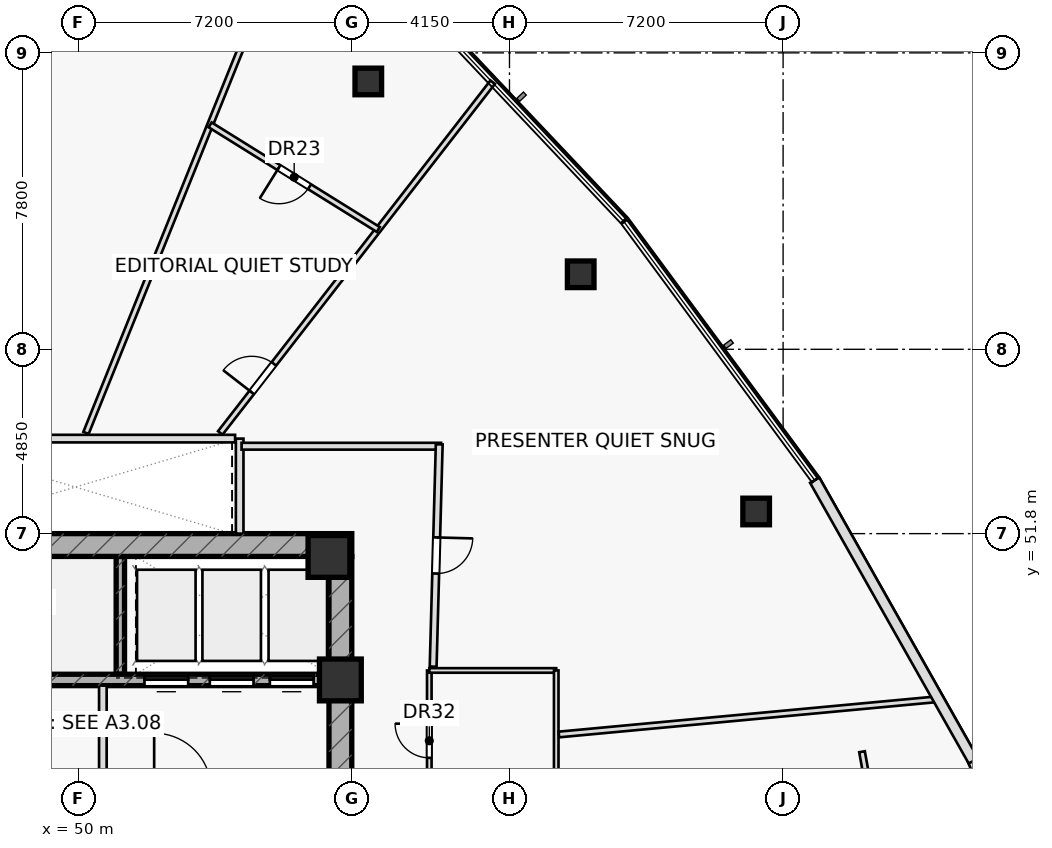
"""IFC4 building model, lengths in metres.
Left out: names, types, materials, properties, quantities, classifications, styles, units other than length and angle.
Written with IfcOpenShell. Run it as: python <this file> out.ifc"""

import sys

from ifc_helpers import new_model, si_unit, direction, frame, frame_2d, origin, origin_2d, place, context, subcontext, project, spatial, rectangle, hollow_rectangle, extrude, element, fill, save


model = new_model("IFC4")
c1 = context("Model", 3, precision=1e-05, world=origin(), true_north=direction((0.0, 1.0)))
c2 = subcontext(c1, "Body", "Model", "MODEL_VIEW")
j1 = project(units=[si_unit("LENGTHUNIT", "METRE"), si_unit("PLANEANGLEUNIT", "RADIAN")], contexts=[c1])
p1 = place(None, origin())
s1 = spatial("IfcSite", under=j1, at=p1, CompositionType="ELEMENT")
p2 = place(p1, origin())
s2 = spatial("IfcBuilding", under=s1, at=p2, CompositionType="ELEMENT")
p3 = place(p2, frame((0.0, 0.0, 66.6)))
s3 = spatial("IfcBuildingStorey", under=s2, at=p3, CompositionType="ELEMENT", Elevation=66.6)
p4 = place(p3, frame((51.11, 48.1, 0.0), z_axis=(0.0, 0.0, 1.0), x_axis=(0.0, 1.0, 0.0)))
e1 = element("IfcWall", 1, at=p4, inside=s3, PredefinedType="SHEAR", context=c2, shape_type="SweptSolid", body=[
    extrude(rectangle(XDim=3.1, YDim=0.22, at=frame_2d((1.55, 0.0))), origin(), (0.0, 0.0, 1.0), 3.6),
])
p5 = place(p3, frame((42.8, 51.5, 0.0), z_axis=(0.0, 0.0, 1.0), x_axis=(1.0, 0.0, 0.0)))
e2 = element("IfcWall", 2, at=p5, inside=s3, PredefinedType="SHEAR", context=c2, shape_type="SweptSolid", body=[
    extrude(rectangle(XDim=14.4, YDim=0.6, at=frame_2d((7.2, 0.0))), origin(), (0.0, 0.0, 1.0), 3.6),
])
p6 = place(p5, frame((0.88, 0.0, 0.0)))
e3 = element("IfcOpeningElement", 3, at=p6, cuts=e2, PredefinedType="OPENING", context=c2, shape_type="SweptSolid", body=[
    extrude(rectangle(XDim=1.05, YDim=2.2, at=frame_2d((0.525, 1.1))), frame((0.0, 0.31, 0.0), z_axis=(0.0, -1.0, 0.0), x_axis=(1.0, 0.0, 0.0)), (0.0, 0.0, 1.0), 0.62),
])
p7 = place(p3, frame((56.9, 38.8, 0.0), z_axis=(0.0, 0.0, 1.0), x_axis=(0.0, 1.0, 0.0)))
e4 = element("IfcWall", 4, at=p7, inside=s3, PredefinedType="SHEAR", context=c2, shape_type="SweptSolid", body=[
    extrude(rectangle(XDim=12.4, YDim=0.6, at=frame_2d((6.2, 0.0))), origin(), (0.0, 0.0, 1.0), 3.6),
])
p8 = place(p7, frame((3.85, 0.0, 0.0)))
e5 = element("IfcOpeningElement", 5, at=p8, cuts=e4, PredefinedType="OPENING", context=c2, shape_type="SweptSolid", body=[
    extrude(rectangle(XDim=1.5, YDim=2.2, at=frame_2d((0.75, 1.1))), frame((0.0, 0.31, 0.0), z_axis=(0.0, -1.0, 0.0), x_axis=(1.0, 0.0, 0.0)), (0.0, 0.0, 1.0), 0.62),
])
p9 = place(p3, frame((43.4, 47.95, 0.0), z_axis=(0.0, 0.0, 1.0), x_axis=(1.0, 0.0, 0.0)))
e6 = element("IfcWall", 6, at=p9, inside=s3, PredefinedType="SHEAR", context=c2, shape_type="SweptSolid", body=[
    extrude(rectangle(XDim=13.2, YDim=0.3, at=frame_2d((6.6, 0.0))), origin(), (0.0, 0.0, 1.0), 3.6),
])
p10 = place(p9, frame((8.345, 0.0, 0.0)))
e7 = element("IfcOpeningElement", 7, at=p10, cuts=e6, PredefinedType="OPENING", context=c2, shape_type="SweptSolid", body=[
    extrude(rectangle(XDim=1.15, YDim=2.2, at=frame_2d((0.575, 1.1))), frame((0.0, 0.16, 0.0), z_axis=(0.0, -1.0, 0.0), x_axis=(1.0, 0.0, 0.0)), (0.0, 0.0, 1.0), 0.32),
])
p11 = place(p9, frame((10.065, 0.0, 0.0)))
e8 = element("IfcOpeningElement", 8, at=p11, cuts=e6, PredefinedType="OPENING", context=c2, shape_type="SweptSolid", body=[
    extrude(rectangle(XDim=1.15, YDim=2.2, at=frame_2d((0.575, 1.1))), frame((0.0, 0.16, 0.0), z_axis=(0.0, -1.0, 0.0), x_axis=(1.0, 0.0, 0.0)), (0.0, 0.0, 1.0), 0.32),
])
p12 = place(p9, frame((11.645, 0.0, 0.0)))
e9 = element("IfcOpeningElement", 9, at=p12, cuts=e6, PredefinedType="OPENING", context=c2, shape_type="SweptSolid", body=[
    extrude(rectangle(XDim=1.15, YDim=2.2, at=frame_2d((0.575, 1.1))), frame((0.0, 0.16, 0.0), z_axis=(0.0, -1.0, 0.0), x_axis=(1.0, 0.0, 0.0)), (0.0, 0.0, 1.0), 0.32),
])
for number, where, z_axis, x_axis in (
    (10, (56.9, 47.95, 0.0), (0.0, 0.0, 1.0), (1.0, 0.0, 0.0)),
    (11, (56.6, 51.2, 0.0), (0.0, 0.0, 1.0), (1.0, 0.0, 0.0)),
):
    element("IfcColumn", number, at=place(p3, frame(where, z_axis=z_axis, x_axis=x_axis)), inside=s3, PredefinedType="COLUMN", context=c2, shape_type="SweptSolid", body=[
        extrude(rectangle(XDim=1.1, YDim=1.1, at=origin_2d()), origin(), (0.0, 0.0, 1.0), 3.6),
    ])
for number, where, z_axis, x_axis in (
    (12, (67.841, 52.383, 0.0), (0.0, 0.0, 1.0), (1.0, 0.0, 0.0)),
    (13, (63.224, 58.624, 0.0), (0.0, 0.0, 1.0), (1.0, 0.0, 0.0)),
    (14, (57.635, 63.698, 0.0), (0.0, 0.0, 1.0), (1.0, 0.0, 0.0)),
):
    element("IfcColumn", number, at=place(p3, frame(where, z_axis=z_axis, x_axis=x_axis)), inside=s3, PredefinedType="COLUMN", context=c2, shape_type="SweptSolid", body=[
        extrude(hollow_rectangle(XDim=0.7, YDim=0.7, WallThickness=0.04, at=origin_2d()), origin(), (0.0, 0.0, 1.0), 3.6),
    ])
p13 = place(p3, frame((54.25, 51.8, 0.0), z_axis=(0.0, 0.0, 1.0), x_axis=(0.0, 1.0, 0.0)))
e15 = element("IfcWall", 15, at=p13, inside=s3, PredefinedType="PARTITIONING", context=c2, shape_type="SweptSolid", body=[
    extrude(rectangle(XDim=2.5, YDim=0.2, at=frame_2d((1.25, 0.0))), origin(), (0.0, 0.0, 1.0), 3.6),
])
p14 = place(p3, frame((50.65, 45.05, 0.0), z_axis=(0.0, 0.0, 1.0), x_axis=(0.0, 1.0, 0.0)))
e16 = element("IfcWall", 16, at=p14, inside=s3, PredefinedType="PARTITIONING", context=c2, shape_type="SweptSolid", body=[
    extrude(rectangle(XDim=2.75, YDim=0.2, at=frame_2d((1.375, 0.0))), origin(), (0.0, 0.0, 1.0), 3.6),
])
p15 = place(p3, frame((72.969, 33.091, 0.0), z_axis=(0.0, 0.0, 1.0), x_axis=(-0.177742578179, 0.984077017261, 0.0)))
e17 = element("IfcWall", 17, at=p15, inside=s3, PredefinedType="PARTITIONING", context=c2, shape_type="SweptSolid", body=[
    extrude(rectangle(XDim=13.179, YDim=0.15, at=frame_2d((6.59, 0.0))), origin(), (0.0, 0.0, 1.0), 2.975),
])
p16 = place(p3, frame((59.24, 41.2, 0.0), z_axis=(0.0, 0.0, 1.0), x_axis=(0.0, 1.0, 0.0)))
e18 = element("IfcWall", 18, at=p16, inside=s3, PredefinedType="PARTITIONING", context=c2, shape_type="SweptSolid", body=[
    extrude(rectangle(XDim=7.0, YDim=0.12, at=frame_2d((3.5, 0.0))), origin(), (0.0, 0.0, 1.0), 3.6),
])
p17 = place(p16, frame((1.15, 0.0, 0.0)))
e19 = element("IfcOpeningElement", 19, at=p17, cuts=e18, PredefinedType="OPENING", context=c2, shape_type="SweptSolid", body=[
    extrude(rectangle(XDim=0.9, YDim=2.05, at=frame_2d((0.45, 1.025))), frame((0.0, 0.07, 0.0), z_axis=(0.0, -1.0, 0.0), x_axis=(1.0, 0.0, 0.0)), (0.0, 0.0, 1.0), 0.14),
])
p18 = place(p16, frame((4.7, 0.0, 0.0)))
e20 = element("IfcOpeningElement", 20, at=p18, cuts=e18, PredefinedType="OPENING", context=c2, shape_type="SweptSolid", body=[
    extrude(rectangle(XDim=0.9, YDim=2.05, at=frame_2d((0.45, 1.025))), frame((0.0, 0.07, 0.0), z_axis=(0.0, -1.0, 0.0), x_axis=(1.0, 0.0, 0.0)), (0.0, 0.0, 1.0), 0.14),
])
p19 = place(p3, frame((59.24, 48.2, 0.0), z_axis=(0.0, 0.0, 1.0), x_axis=(1.0, 0.0, 0.0)))
e21 = element("IfcWall", 21, at=p19, inside=s3, PredefinedType="PARTITIONING", context=c2, shape_type="SweptSolid", body=[
    extrude(rectangle(XDim=3.34, YDim=0.12, at=frame_2d((1.67, 0.0))), origin(), (0.0, 0.0, 1.0), 3.6),
])
p20 = place(p3, frame((62.58, 41.2, 0.0), z_axis=(0.0, 0.0, 1.0), x_axis=(0.0, 1.0, 0.0)))
e22 = element("IfcWall", 22, at=p20, inside=s3, PredefinedType="PARTITIONING", context=c2, shape_type="SweptSolid", body=[
    extrude(rectangle(XDim=7.0, YDim=0.12, at=frame_2d((3.5, 0.0))), origin(), (0.0, 0.0, 1.0), 3.6),
])
p21 = place(p3, frame((62.65, 46.515, 0.0), z_axis=(0.0, 0.0, 1.0), x_axis=(0.995684565506, 0.092802187545, 0.0)))
e23 = element("IfcWall", 23, at=p21, inside=s3, PredefinedType="PARTITIONING", context=c2, shape_type="SweptSolid", body=[
    extrude(rectangle(XDim=10.042, YDim=0.15, at=frame_2d((5.021, 0.0))), origin(), (0.0, 0.0, 1.0), 3.025),
])
p22 = place(p3, frame((53.74, 54.45, 0.0), z_axis=(0.0, 0.0, 1.0), x_axis=(0.613412549252, 0.789762650687, 0.0)))
e24 = element("IfcWall", 24, at=p22, inside=s3, PredefinedType="PARTITIONING", context=c2, shape_type="SweptSolid", body=[
    extrude(rectangle(XDim=11.686, YDim=0.15, at=frame_2d((5.843, 0.0))), origin(), (0.0, 0.0, 1.0), 2.975),
])
p23 = place(p22, frame((1.35, 0.0, 0.0)))
e25 = element("IfcOpeningElement", 25, at=p23, cuts=e24, PredefinedType="OPENING", context=c2, shape_type="SweptSolid", body=[
    extrude(rectangle(XDim=0.95, YDim=2.05, at=frame_2d((0.475, 1.025))), frame((0.0, 0.085, 0.0), z_axis=(0.0, -1.0, 0.0), x_axis=(1.0, 0.0, 0.0)), (0.0, 0.0, 1.0), 0.17),
])
p24 = place(p3, frame((50.207, 54.45, 0.0), z_axis=(0.0, 0.0, 1.0), x_axis=(0.373638533128, 0.927574388695, 0.0)))
e26 = element("IfcWall", 26, at=p24, inside=s3, PredefinedType="PARTITIONING", context=c2, shape_type="SweptSolid", body=[
    extrude(rectangle(XDim=15.067, YDim=0.15, at=frame_2d((7.534, 0.0))), origin(), (0.0, 0.0, 1.0), 2.975),
])
p25 = place(p3, frame((57.898, 59.803, 0.0), z_axis=(0.0, 0.0, 1.0), x_axis=(-0.849125227798, 0.52819158221, 0.0)))
e27 = element("IfcWall", 27, at=p25, inside=s3, PredefinedType="PARTITIONING", context=c2, shape_type="SweptSolid", body=[
    extrude(rectangle(XDim=5.212, YDim=0.15, at=frame_2d((2.606, 0.0))), origin(), (0.0, 0.0, 1.0), 2.975),
])
p26 = place(p25, frame((2.131, 0.0, 0.0)))
e28 = element("IfcOpeningElement", 28, at=p26, cuts=e27, PredefinedType="OPENING", context=c2, shape_type="SweptSolid", body=[
    extrude(rectangle(XDim=0.95, YDim=2.05, at=frame_2d((0.475, 1.025))), frame((0.0, 0.085, 0.0), z_axis=(0.0, -1.0, 0.0), x_axis=(1.0, 0.0, 0.0)), (0.0, 0.0, 1.0), 0.17),
])
p27 = place(p3, frame((54.3, 54.1, 0.0), z_axis=(0.0, 0.0, 1.0), x_axis=(1.0, 0.0, 0.0)))
e29 = element("IfcWall", 29, at=p27, inside=s3, PredefinedType="PARTITIONING", context=c2, shape_type="SweptSolid", body=[
    extrude(rectangle(XDim=5.25, YDim=0.18, at=frame_2d((2.625, 0.0))), origin(), (0.0, 0.0, 1.0), 2.975),
])
p28 = place(p3, frame((59.501, 54.15, 0.0), z_axis=(0.0, 0.0, 1.0), x_axis=(-0.027367567602, -0.999625437973, 0.0)))
e30 = element("IfcWall", 30, at=p28, inside=s3, PredefinedType="PARTITIONING", context=c2, shape_type="SweptSolid", body=[
    extrude(rectangle(XDim=5.852, YDim=0.18, at=frame_2d((2.926, 0.0))), origin(), (0.0, 0.0, 1.0), 2.975),
])
p29 = place(p28, frame((2.451, 0.0, 0.0)))
e31 = element("IfcOpeningElement", 31, at=p29, cuts=e30, PredefinedType="OPENING", context=c2, shape_type="SweptSolid", body=[
    extrude(rectangle(XDim=0.95, YDim=2.05, at=frame_2d((0.475, 1.025))), frame((0.0, 0.1, 0.0), z_axis=(0.0, -1.0, 0.0), x_axis=(1.0, 0.0, 0.0)), (0.0, 0.0, 1.0), 0.2),
])
p30 = place(p3, frame((76.798, 37.998, 0.0), z_axis=(0.0, 0.0, 1.0), x_axis=(-0.383058080103, 0.923724259326, 0.0)))
e32 = element("IfcWall", 32, at=p30, inside=s3, PredefinedType="STANDARD", context=c2, shape_type="SweptSolid", body=[
    extrude(rectangle(XDim=8.497, YDim=0.28, at=frame_2d((4.248, 0.0))), origin(), (0.0, 0.0, 1.0), 3.6),
])
p31 = place(p3, frame((73.556, 45.82, 0.0), z_axis=(0.0, 0.0, 1.0), x_axis=(-0.492021225842, 0.870583202986, 0.0)))
e33 = element("IfcWall", 33, at=p31, inside=s3, PredefinedType="STANDARD", context=c2, shape_type="SweptSolid", body=[
    extrude(rectangle(XDim=8.485, YDim=0.28, at=frame_2d((4.242, 0.0))), origin(), (0.0, 0.0, 1.0), 3.6),
])
p32 = place(p3, frame((45.82, 54.3, 0.0), z_axis=(0.0, 0.0, 1.0), x_axis=(1.0, 0.0, 0.0)))
e34 = element("IfcWall", 34, at=p32, inside=s3, PredefinedType="PARTITIONING", context=c2, shape_type="SweptSolid", body=[
    extrude(rectangle(XDim=8.31, YDim=0.2, at=frame_2d((4.155, 0.0))), origin(), (0.0, 0.0, 1.0), 3.6),
])
p33 = place(p18, origin())
e35 = element("IfcDoor", 35, at=p33, inside=s3, OperationType="SINGLE_SWING_RIGHT", PredefinedType="DOOR", context=c2, shape_type="SweptSolid", body=[
    extrude(rectangle(XDim=0.9, YDim=2.05, at=frame_2d((0.45, 1.025))), frame((0.0, 0.025, 0.0), z_axis=(0.0, -1.0, 0.0), x_axis=(1.0, 0.0, 0.0)), (0.0, 0.0, 1.0), 0.05),
])
fill(e20, e35)
p34 = place(p23, origin())
e36 = element("IfcDoor", 36, at=p34, inside=s3, OperationType="SINGLE_SWING_LEFT", PredefinedType="DOOR", context=c2, shape_type="SweptSolid", body=[
    extrude(rectangle(XDim=0.95, YDim=2.05, at=frame_2d((0.475, 1.025))), frame((0.0, 0.025, 0.0), z_axis=(0.0, -1.0, 0.0), x_axis=(1.0, 0.0, 0.0)), (0.0, 0.0, 1.0), 0.05),
])
fill(e25, e36)
p35 = place(p26, origin())
e37 = element("IfcDoor", 37, at=p35, inside=s3, OperationType="SINGLE_SWING_RIGHT", PredefinedType="DOOR", context=c2, shape_type="SweptSolid", body=[
    extrude(rectangle(XDim=0.95, YDim=2.05, at=frame_2d((0.475, 1.025))), frame((0.0, 0.025, 0.0), z_axis=(0.0, -1.0, 0.0), x_axis=(1.0, 0.0, 0.0)), (0.0, 0.0, 1.0), 0.05),
])
fill(e28, e37)
p36 = place(p29, origin())
e38 = element("IfcDoor", 38, at=p36, inside=s3, OperationType="SINGLE_SWING_LEFT", PredefinedType="DOOR", context=c2, shape_type="SweptSolid", body=[
    extrude(rectangle(XDim=0.95, YDim=2.05, at=frame_2d((0.475, 1.025))), frame((0.0, 0.025, 0.0), z_axis=(0.0, -1.0, 0.0), x_axis=(1.0, 0.0, 0.0)), (0.0, 0.0, 1.0), 0.05),
])
fill(e31, e38)
p37 = place(p10, origin())
e39 = element("IfcDoor", 39, at=p37, inside=s3, OperationType="SLIDING_TO_LEFT", PredefinedType="DOOR", context=c2, shape_type="SweptSolid", body=[
    extrude(rectangle(XDim=1.15, YDim=2.2, at=frame_2d((0.575, 1.1))), frame((0.0, 0.025, 0.0), z_axis=(0.0, -1.0, 0.0), x_axis=(1.0, 0.0, 0.0)), (0.0, 0.0, 1.0), 0.05),
])
fill(e7, e39)
p38 = place(p11, origin())
e40 = element("IfcDoor", 40, at=p38, inside=s3, OperationType="SLIDING_TO_LEFT", PredefinedType="DOOR", context=c2, shape_type="SweptSolid", body=[
    extrude(rectangle(XDim=1.15, YDim=2.2, at=frame_2d((0.575, 1.1))), frame((0.0, 0.025, 0.0), z_axis=(0.0, -1.0, 0.0), x_axis=(1.0, 0.0, 0.0)), (0.0, 0.0, 1.0), 0.05),
])
fill(e8, e40)
p39 = place(p12, origin())
e41 = element("IfcDoor", 41, at=p39, inside=s3, OperationType="SLIDING_TO_LEFT", PredefinedType="DOOR", context=c2, shape_type="SweptSolid", body=[
    extrude(rectangle(XDim=1.15, YDim=2.2, at=frame_2d((0.575, 1.1))), frame((0.0, 0.025, 0.0), z_axis=(0.0, -1.0, 0.0), x_axis=(1.0, 0.0, 0.0)), (0.0, 0.0, 1.0), 0.05),
])
fill(e9, e41)
save(model, sys.argv[1])
